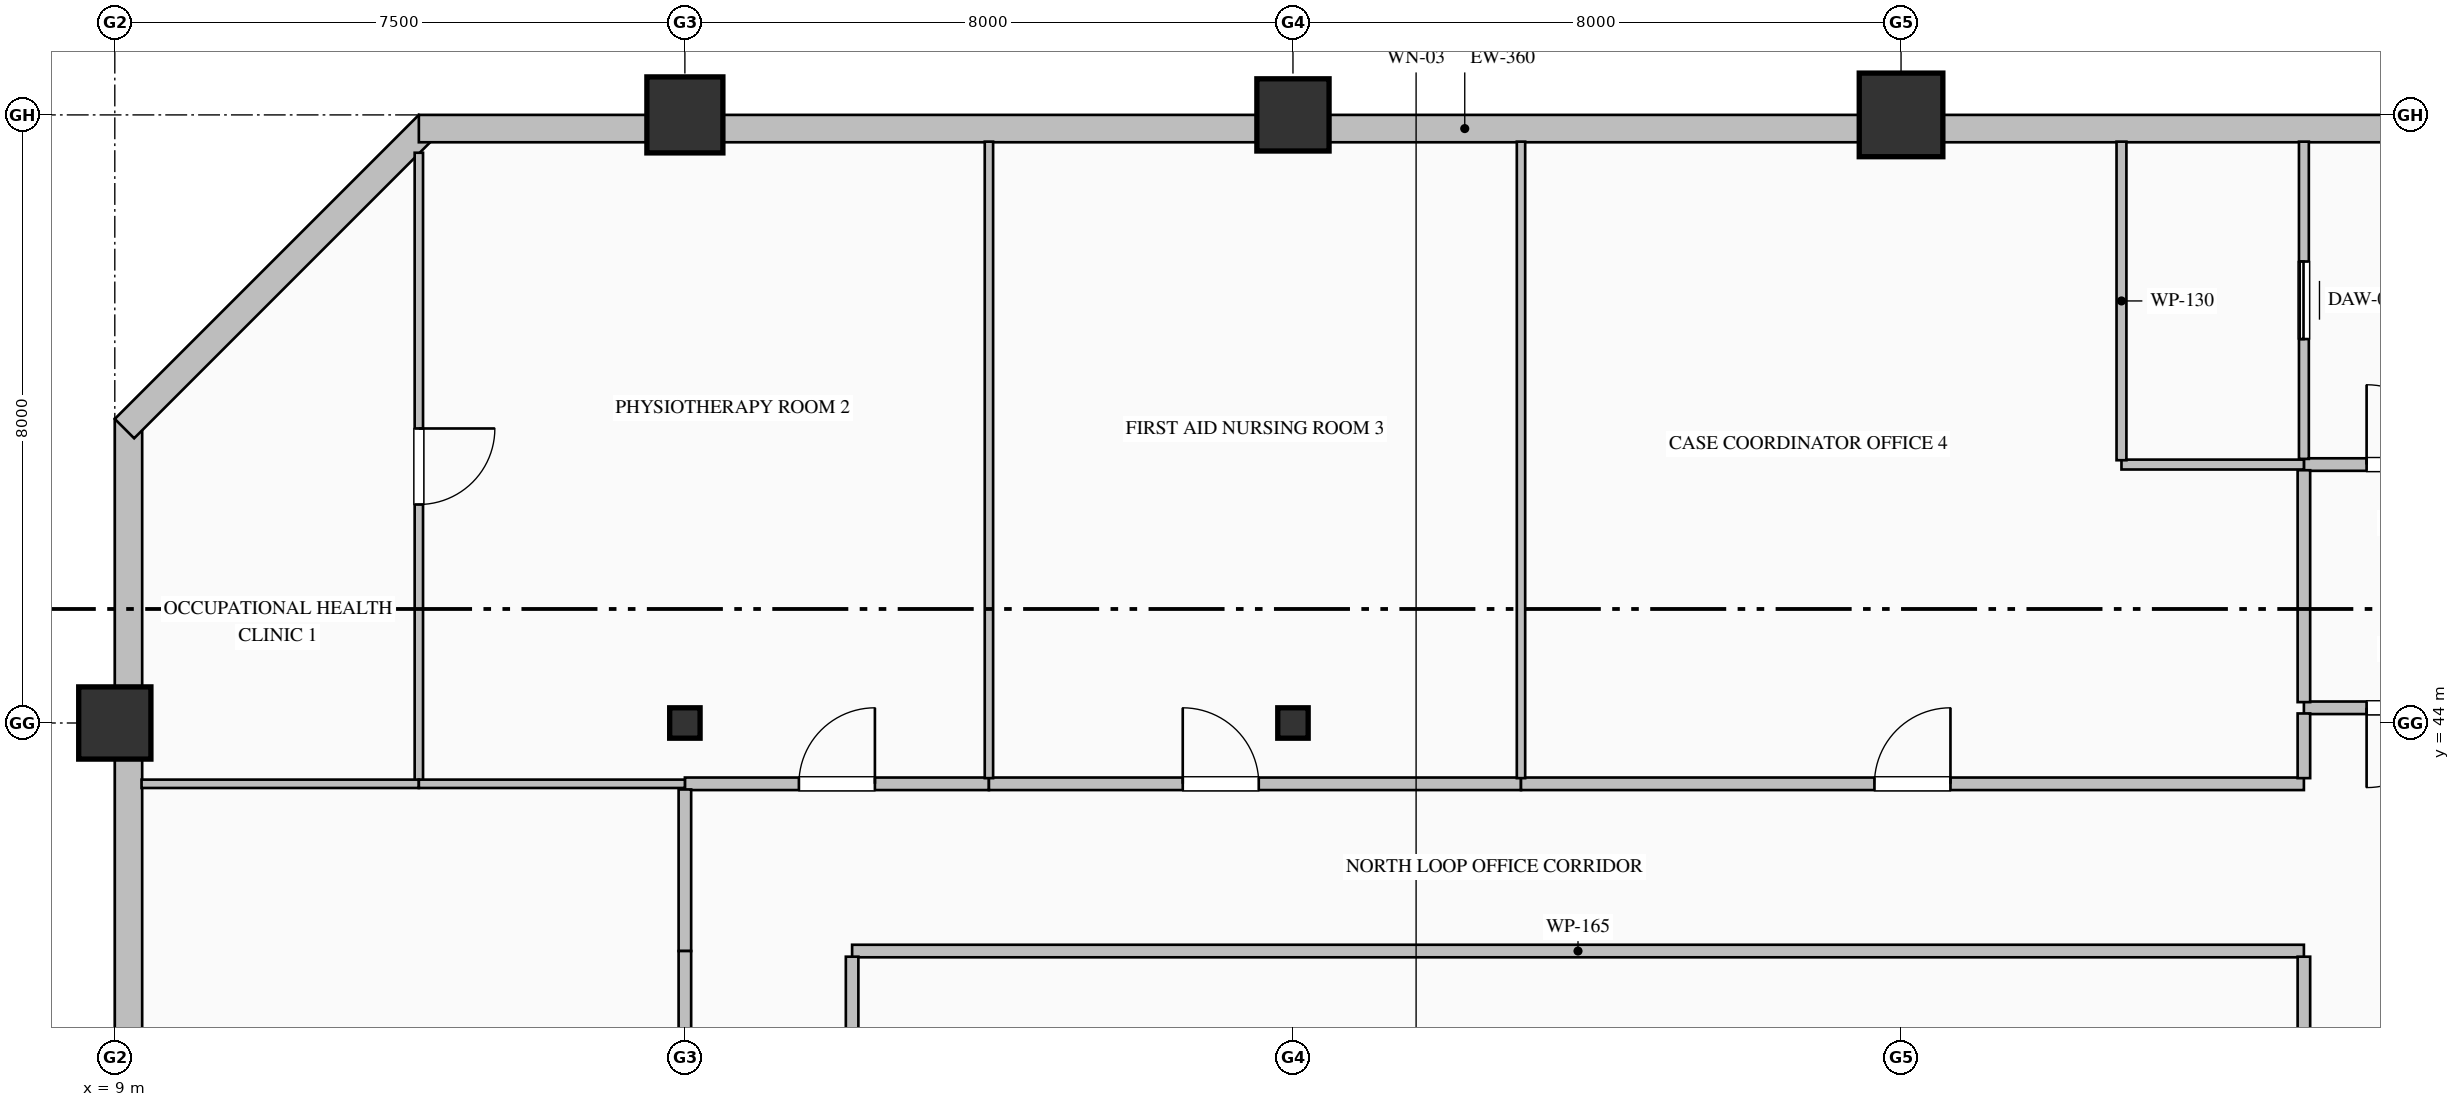
"""IFC4 building model, lengths in metres.
Left out: names, types, materials, properties, quantities, classifications, styles, units other than length and angle.
Written with IfcOpenShell. Run it as: python <this file> out.ifc"""

import sys

from ifc_helpers import new_model, si_unit, direction, frame, frame_2d, origin, origin_2d, place, context, subcontext, project, spatial, rectangle, hollow_rectangle, hollow_circle, i_section, extrude, element, fill, save


model = new_model("IFC4")
c1 = context("Model", 3, precision=1e-05, world=origin(), true_north=direction((0.0, 1.0)))
c2 = subcontext(c1, "Body", "Model", "MODEL_VIEW")
j1 = project(units=[si_unit("LENGTHUNIT", "METRE"), si_unit("PLANEANGLEUNIT", "RADIAN")], contexts=[c1])
p1 = place(None, origin())
s1 = spatial("IfcSite", under=j1, at=p1, CompositionType="ELEMENT")
p2 = place(p1, origin())
s2 = spatial("IfcBuilding", under=s1, at=p2, CompositionType="ELEMENT")
p3 = place(p2, frame((0.0, 0.0, 171.0)))
s3 = spatial("IfcBuildingStorey", under=s2, at=p3, CompositionType="ELEMENT", Elevation=171.0)
p4 = place(p3, frame((9.0, 44.0, 0.0), z_axis=(0.0, 0.0, 1.0), x_axis=(1.0, 0.0, 0.0)))
e1 = element("IfcColumn", 1, at=p4, inside=s3, PredefinedType="COLUMN", context=c2, shape_type="SweptSolid", body=[
    extrude(hollow_rectangle(XDim=0.95, YDim=0.95, WallThickness=0.036, at=origin_2d()), origin(), (0.0, 0.0, 1.0), 4.0),
])
p5 = place(p3, frame((16.5, 44.0, 0.0), z_axis=(0.0, 0.0, 1.0), x_axis=(1.0, 0.0, 0.0)))
e2 = element("IfcColumn", 2, at=p5, inside=s3, PredefinedType="COLUMN", context=c2, shape_type="SweptSolid", body=[
    extrude(i_section(OverallWidth=0.4, OverallDepth=0.4, WebThickness=0.013, FlangeThickness=0.021, FilletRadius=0.022, at=origin_2d()), origin(), (0.0, 0.0, 1.0), 4.0),
])
p6 = place(p3, frame((16.5, 52.0, 0.0), z_axis=(0.0, 0.0, 1.0), x_axis=(1.0, 0.0, 0.0)))
e3 = element("IfcColumn", 3, at=p6, inside=s3, PredefinedType="COLUMN", context=c2, shape_type="SweptSolid", body=[
    extrude(hollow_circle(Radius=0.5, WallThickness=0.036, at=origin_2d()), origin(), (0.0, 0.0, 1.0), 4.0),
])
p7 = place(p3, frame((24.5, 44.0, 0.0), z_axis=(0.0, 0.0, 1.0), x_axis=(1.0, 0.0, 0.0)))
e4 = element("IfcColumn", 4, at=p7, inside=s3, PredefinedType="COLUMN", context=c2, shape_type="SweptSolid", body=[
    extrude(i_section(OverallWidth=0.4, OverallDepth=0.4, WebThickness=0.013, FlangeThickness=0.021, FilletRadius=0.022, at=origin_2d()), origin(), (0.0, 0.0, 1.0), 4.0),
])
p8 = place(p3, frame((24.5, 52.0, 0.0), z_axis=(0.0, 0.0, 1.0), x_axis=(1.0, 0.0, 0.0)))
e5 = element("IfcColumn", 5, at=p8, inside=s3, PredefinedType="COLUMN", context=c2, shape_type="SweptSolid", body=[
    extrude(hollow_rectangle(XDim=0.95, YDim=0.95, WallThickness=0.036, at=origin_2d()), origin(), (0.0, 0.0, 1.0), 4.0),
])
p9 = place(p3, frame((32.5, 52.0, 0.0), z_axis=(0.0, 0.0, 1.0), x_axis=(1.0, 0.0, 0.0)))
e6 = element("IfcColumn", 6, at=p9, inside=s3, PredefinedType="COLUMN", context=c2, shape_type="SweptSolid", body=[
    extrude(hollow_rectangle(XDim=1.1, YDim=1.1, WallThickness=0.04, at=origin_2d()), origin(), (0.0, 0.0, 1.0), 4.0),
])
p10 = place(p3, frame((9.18, 32.0, 0.0), z_axis=(0.0, 0.0, 1.0), x_axis=(0.0, 1.0, 0.0)))
e7 = element("IfcWall", 7, at=p10, inside=s3, PredefinedType="SOLIDWALL", context=c2, shape_type="SweptSolid", body=[
    extrude(rectangle(XDim=16.0, YDim=0.36, at=frame_2d((8.0, 0.0))), origin(), (0.0, 0.0, 1.0), 3.265),
])
p11 = place(p10, frame((6.45, 0.0, 0.85)))
e8 = element("IfcOpeningElement", 8, at=p11, cuts=e7, PredefinedType="OPENING", context=c2, shape_type="SweptSolid", body=[
    extrude(rectangle(XDim=1.5, YDim=1.95, at=frame_2d((0.75, 0.975))), frame((0.0, 0.19, 0.0), z_axis=(0.0, -1.0, 0.0), x_axis=(1.0, 0.0, 0.0)), (0.0, 0.0, 1.0), 0.38),
])
p12 = place(p3, frame((9.127, 47.873, 0.0), z_axis=(0.0, 0.0, 1.0), x_axis=(0.707106781187, 0.707106781187, 0.0)))
e9 = element("IfcWall", 9, at=p12, inside=s3, PredefinedType="SOLIDWALL", context=c2, shape_type="SweptSolid", body=[
    extrude(rectangle(XDim=5.657, YDim=0.36, at=frame_2d((2.828, 0.0))), origin(), (0.0, 0.0, 1.0), 3.765),
])
p13 = place(p3, frame((13.0, 51.82, 0.0), z_axis=(0.0, 0.0, 1.0), x_axis=(1.0, 0.0, 0.0)))
e10 = element("IfcWall", 10, at=p13, inside=s3, PredefinedType="SOLIDWALL", context=c2, shape_type="SweptSolid", body=[
    extrude(rectangle(XDim=27.52, YDim=0.36, at=frame_2d((13.76, 0.0))), origin(), (0.0, 0.0, 1.0), 3.265),
])
p14 = place(p3, frame((37.8, 47.4, 0.0), z_axis=(0.0, 0.0, 1.0), x_axis=(1.0, 0.0, 0.0)))
e11 = element("IfcWall", 11, at=p14, inside=s3, PredefinedType="PARTITIONING", context=c2, shape_type="SweptSolid", body=[
    extrude(rectangle(XDim=2.7, YDim=0.165, at=frame_2d((1.35, 0.0))), origin(), (0.0, 0.0, 1.0), 3.765),
])
p15 = place(p14, frame((0.825, 0.0, 0.0)))
e12 = element("IfcOpeningElement", 12, at=p15, cuts=e11, PredefinedType="OPENING", context=c2, shape_type="SweptSolid", body=[
    extrude(rectangle(XDim=1.05, YDim=2.15, at=frame_2d((0.525, 1.075))), frame((0.0, 0.093, 0.0), z_axis=(0.0, -1.0, 0.0), x_axis=(1.0, 0.0, 0.0)), (0.0, 0.0, 1.0), 0.185),
])
p16 = place(p3, frame((40.5, 44.2, 0.0), z_axis=(0.0, 0.0, 1.0), x_axis=(-1.0, 0.0, 0.0)))
e13 = element("IfcWall", 13, at=p16, inside=s3, PredefinedType="PARTITIONING", context=c2, shape_type="SweptSolid", body=[
    extrude(rectangle(XDim=2.7, YDim=0.165, at=frame_2d((1.35, 0.0))), origin(), (0.0, 0.0, 1.0), 3.765),
])
p17 = place(p16, frame((0.825, 0.0, 0.0)))
e14 = element("IfcOpeningElement", 14, at=p17, cuts=e13, PredefinedType="OPENING", context=c2, shape_type="SweptSolid", body=[
    extrude(rectangle(XDim=1.05, YDim=2.15, at=frame_2d((0.525, 1.075))), frame((0.0, 0.093, 0.0), z_axis=(0.0, -1.0, 0.0), x_axis=(1.0, 0.0, 0.0)), (0.0, 0.0, 1.0), 0.185),
])
p18 = place(p3, frame((37.8, 44.274, 0.0), z_axis=(0.0, 0.0, 1.0), x_axis=(0.0, 1.0, 0.0)))
e15 = element("IfcWall", 15, at=p18, inside=s3, PredefinedType="PARTITIONING", context=c2, shape_type="SweptSolid", body=[
    extrude(rectangle(XDim=3.051, YDim=0.165, at=frame_2d((1.525, 0.0))), origin(), (0.0, 0.0, 1.0), 3.765),
])
p19 = place(p3, frame((37.8, 47.475, 0.0), z_axis=(0.0, 0.0, 1.0), x_axis=(0.0, 1.0, 0.0)))
e16 = element("IfcWall", 16, at=p19, inside=s3, PredefinedType="PARTITIONING", context=c2, shape_type="SweptSolid", body=[
    extrude(rectangle(XDim=4.173, YDim=0.13, at=frame_2d((2.087, 0.0))), origin(), (0.0, 0.0, 1.0), 3.765),
])
p20 = place(p19, frame((1.577, 0.0, 0.0)))
e17 = element("IfcOpeningElement", 17, at=p20, cuts=e16, PredefinedType="OPENING", context=c2, shape_type="SweptSolid", body=[
    extrude(rectangle(XDim=1.02, YDim=2.15, at=frame_2d((0.51, 1.075))), frame((0.0, 0.075, 0.0), z_axis=(0.0, -1.0, 0.0), x_axis=(1.0, 0.0, 0.0)), (0.0, 0.0, 1.0), 0.15),
])
p21 = place(p3, frame((37.8, 47.4, 0.0), z_axis=(0.0, 0.0, 1.0), x_axis=(-1.0, 0.0, 0.0)))
e18 = element("IfcWall", 18, at=p21, inside=s3, PredefinedType="PARTITIONING", context=c2, shape_type="SweptSolid", body=[
    extrude(rectangle(XDim=2.4, YDim=0.13, at=frame_2d((1.2, 0.0))), origin(), (0.0, 0.0, 1.0), 3.765),
])
p22 = place(p3, frame((35.4, 47.457, 0.0), z_axis=(0.0, 0.0, 1.0), x_axis=(0.0, 1.0, 0.0)))
e19 = element("IfcWall", 19, at=p22, inside=s3, PredefinedType="PARTITIONING", context=c2, shape_type="SweptSolid", body=[
    extrude(rectangle(XDim=4.191, YDim=0.13, at=frame_2d((2.095, 0.0))), origin(), (0.0, 0.0, 1.0), 3.765),
])
p23 = place(p3, frame((16.5, 43.2, 0.0), z_axis=(0.0, 0.0, 1.0), x_axis=(1.0, 0.0, 0.0)))
e20 = element("IfcWall", 20, at=p23, inside=s3, PredefinedType="PARTITIONING", context=c2, shape_type="SweptSolid", body=[
    extrude(rectangle(XDim=4.0, YDim=0.165, at=frame_2d((2.0, 0.0))), origin(), (0.0, 0.0, 1.0), 3.765),
])
p24 = place(p23, frame((1.5, 0.0, 0.0)))
e21 = element("IfcOpeningElement", 21, at=p24, cuts=e20, PredefinedType="OPENING", context=c2, shape_type="SweptSolid", body=[
    extrude(rectangle(XDim=1.0, YDim=2.15, at=frame_2d((0.5, 1.075))), frame((0.0, 0.093, 0.0), z_axis=(0.0, -1.0, 0.0), x_axis=(1.0, 0.0, 0.0)), (0.0, 0.0, 1.0), 0.185),
])
p25 = place(p3, frame((20.5, 43.2, 0.0), z_axis=(0.0, 0.0, 1.0), x_axis=(1.0, 0.0, 0.0)))
e22 = element("IfcWall", 22, at=p25, inside=s3, PredefinedType="PARTITIONING", context=c2, shape_type="SweptSolid", body=[
    extrude(rectangle(XDim=7.0, YDim=0.165, at=frame_2d((3.5, 0.0))), origin(), (0.0, 0.0, 1.0), 3.765),
])
p26 = place(p25, frame((2.55, 0.0, 0.0)))
e23 = element("IfcOpeningElement", 23, at=p26, cuts=e22, PredefinedType="OPENING", context=c2, shape_type="SweptSolid", body=[
    extrude(rectangle(XDim=1.0, YDim=2.15, at=frame_2d((0.5, 1.075))), frame((0.0, 0.093, 0.0), z_axis=(0.0, -1.0, 0.0), x_axis=(1.0, 0.0, 0.0)), (0.0, 0.0, 1.0), 0.185),
])
p27 = place(p3, frame((27.5, 43.2, 0.0), z_axis=(0.0, 0.0, 1.0), x_axis=(1.0, 0.0, 0.0)))
e24 = element("IfcWall", 24, at=p27, inside=s3, PredefinedType="PARTITIONING", context=c2, shape_type="SweptSolid", body=[
    extrude(rectangle(XDim=10.3, YDim=0.165, at=frame_2d((5.15, 0.0))), origin(), (0.0, 0.0, 1.0), 3.765),
])
p28 = place(p27, frame((4.65, 0.0, 0.0)))
e25 = element("IfcOpeningElement", 25, at=p28, cuts=e24, PredefinedType="OPENING", context=c2, shape_type="SweptSolid", body=[
    extrude(rectangle(XDim=1.0, YDim=2.15, at=frame_2d((0.5, 1.075))), frame((0.0, 0.093, 0.0), z_axis=(0.0, -1.0, 0.0), x_axis=(1.0, 0.0, 0.0)), (0.0, 0.0, 1.0), 0.185),
])
p29 = place(p3, frame((37.8, 41.0, 0.0), z_axis=(0.0, 0.0, 1.0), x_axis=(-1.0, 0.0, 0.0)))
e26 = element("IfcWall", 26, at=p29, inside=s3, PredefinedType="PARTITIONING", context=c2, shape_type="SweptSolid", body=[
    extrude(rectangle(XDim=19.1, YDim=0.165, at=frame_2d((9.55, 0.0))), origin(), (0.0, 0.0, 1.0), 3.765),
])
p30 = place(p3, frame((16.5, 41.0, 0.0), z_axis=(0.0, 0.0, 1.0), x_axis=(0.0, 1.0, 0.0)))
e27 = element("IfcWall", 27, at=p30, inside=s3, PredefinedType="PARTITIONING", context=c2, shape_type="SweptSolid", body=[
    extrude(rectangle(XDim=2.125, YDim=0.165, at=frame_2d((1.063, 0.0))), origin(), (0.0, 0.0, 1.0), 3.157),
])
p31 = place(p3, frame((18.7, 40.926, 0.0), z_axis=(0.0, 0.0, 1.0), x_axis=(0.0, -1.0, 0.0)))
e28 = element("IfcWall", 28, at=p31, inside=s3, PredefinedType="PARTITIONING", context=c2, shape_type="SweptSolid", body=[
    extrude(rectangle(XDim=7.451, YDim=0.165, at=frame_2d((3.726, 0.0))), origin(), (0.0, 0.0, 1.0), 3.765),
])
p32 = place(p3, frame((16.5, 33.4, 0.0), z_axis=(0.0, 0.0, 1.0), x_axis=(0.0, 1.0, 0.0)))
e29 = element("IfcWall", 29, at=p32, inside=s3, PredefinedType="PARTITIONING", context=c2, shape_type="SweptSolid", body=[
    extrude(rectangle(XDim=7.6, YDim=0.165, at=frame_2d((3.8, 0.0))), origin(), (0.0, 0.0, 1.0), 3.157),
])
p33 = place(p32, frame((3.3, 0.0, 0.0)))
e30 = element("IfcOpeningElement", 30, at=p33, cuts=e29, PredefinedType="OPENING", context=c2, shape_type="SweptSolid", body=[
    extrude(rectangle(XDim=1.0, YDim=2.15, at=frame_2d((0.5, 1.075))), frame((0.0, 0.093, 0.0), z_axis=(0.0, -1.0, 0.0), x_axis=(1.0, 0.0, 0.0)), (0.0, 0.0, 1.0), 0.185),
])
p34 = place(p3, frame((37.8, 43.274, 0.0), z_axis=(0.0, 0.0, 1.0), x_axis=(0.0, 1.0, 0.0)))
e31 = element("IfcWall", 31, at=p34, inside=s3, PredefinedType="PARTITIONING", context=c2, shape_type="SweptSolid", body=[
    extrude(rectangle(XDim=0.851, YDim=0.165, at=frame_2d((0.426, 0.0))), origin(), (0.0, 0.0, 1.0), 3.765),
])
p35 = place(p3, frame((37.8, 33.475, 0.0), z_axis=(0.0, 0.0, 1.0), x_axis=(0.0, 1.0, 0.0)))
e32 = element("IfcWall", 32, at=p35, inside=s3, PredefinedType="PARTITIONING", context=c2, shape_type="SweptSolid", body=[
    extrude(rectangle(XDim=7.451, YDim=0.165, at=frame_2d((3.726, 0.0))), origin(), (0.0, 0.0, 1.0), 3.765),
])
p36 = place(p3, frame((13.0, 51.502, 0.0), z_axis=(0.0, 0.0, 1.0), x_axis=(0.0, -1.0, 0.0)))
e33 = element("IfcWall", 33, at=p36, inside=s3, PredefinedType="MOVABLE", context=c2, shape_type="SweptSolid", body=[
    extrude(rectangle(XDim=8.255, YDim=0.11, at=frame_2d((4.127, 0.0))), origin(), (0.0, 0.0, 1.0), 3.765),
])
p37 = place(p36, frame((3.628, 0.0, 0.0)))
e34 = element("IfcOpeningElement", 34, at=p37, cuts=e33, PredefinedType="OPENING", context=c2, shape_type="SweptSolid", body=[
    extrude(rectangle(XDim=1.0, YDim=2.15, at=frame_2d((0.5, 1.075))), frame((0.0, 0.065, 0.0), z_axis=(0.0, -1.0, 0.0), x_axis=(1.0, 0.0, 0.0)), (0.0, 0.0, 1.0), 0.13),
])
p38 = place(p3, frame((13.0, 43.2, 0.0), z_axis=(0.0, 0.0, 1.0), x_axis=(-1.0, 0.0, 0.0)))
e35 = element("IfcWall", 35, at=p38, inside=s3, PredefinedType="MOVABLE", context=c2, shape_type="SweptSolid", body=[
    extrude(rectangle(XDim=3.648, YDim=0.11, at=frame_2d((1.824, 0.0))), origin(), (0.0, 0.0, 1.0), 3.765),
])
p39 = place(p3, frame((20.5, 51.648, 0.0), z_axis=(0.0, 0.0, 1.0), x_axis=(0.0, -1.0, 0.0)))
e36 = element("IfcWall", 36, at=p39, inside=s3, PredefinedType="MOVABLE", context=c2, shape_type="SweptSolid", body=[
    extrude(rectangle(XDim=8.374, YDim=0.11, at=frame_2d((4.187, 0.0))), origin(), (0.0, 0.0, 1.0), 3.765),
])
p40 = place(p3, frame((16.5, 43.2, 0.0), z_axis=(0.0, 0.0, 1.0), x_axis=(-1.0, 0.0, 0.0)))
e37 = element("IfcWall", 37, at=p40, inside=s3, PredefinedType="MOVABLE", context=c2, shape_type="SweptSolid", body=[
    extrude(rectangle(XDim=3.5, YDim=0.11, at=frame_2d((1.75, 0.0))), origin(), (0.0, 0.0, 1.0), 3.765),
])
p41 = place(p3, frame((27.5, 51.648, 0.0), z_axis=(0.0, 0.0, 1.0), x_axis=(0.0, -1.0, 0.0)))
e38 = element("IfcWall", 38, at=p41, inside=s3, PredefinedType="MOVABLE", context=c2, shape_type="SweptSolid", body=[
    extrude(rectangle(XDim=8.374, YDim=0.11, at=frame_2d((4.187, 0.0))), origin(), (0.0, 0.0, 1.0), 3.765),
])
p42 = place(p15, origin())
e39 = element("IfcDoor", 39, at=p42, inside=s3, OperationType="SINGLE_SWING_LEFT", PredefinedType="DOOR", context=c2, shape_type="SweptSolid", body=[
    extrude(rectangle(XDim=1.05, YDim=2.15, at=frame_2d((0.525, 1.075))), frame((0.0, 0.025, 0.0), z_axis=(0.0, -1.0, 0.0), x_axis=(1.0, 0.0, 0.0)), (0.0, 0.0, 1.0), 0.05),
])
fill(e12, e39)
p43 = place(p17, origin())
e40 = element("IfcDoor", 40, at=p43, inside=s3, OperationType="SINGLE_SWING_RIGHT", PredefinedType="DOOR", context=c2, shape_type="SweptSolid", body=[
    extrude(rectangle(XDim=1.05, YDim=2.15, at=frame_2d((0.525, 1.075))), frame((0.0, 0.025, 0.0), z_axis=(0.0, -1.0, 0.0), x_axis=(1.0, 0.0, 0.0)), (0.0, 0.0, 1.0), 0.05),
])
fill(e14, e40)
p44 = place(p20, origin())
e41 = element("IfcDoor", 41, at=p44, inside=s3, OperationType="SLIDING_TO_LEFT", PredefinedType="DOOR", context=c2, shape_type="SweptSolid", body=[
    extrude(rectangle(XDim=1.02, YDim=2.15, at=frame_2d((0.51, 1.075))), frame((0.0, 0.025, 0.0), z_axis=(0.0, -1.0, 0.0), x_axis=(1.0, 0.0, 0.0)), (0.0, 0.0, 1.0), 0.05),
])
fill(e17, e41)
p45 = place(p37, origin())
e42 = element("IfcDoor", 42, at=p45, inside=s3, OperationType="SINGLE_SWING_LEFT", PredefinedType="DOOR", context=c2, shape_type="SweptSolid", body=[
    extrude(rectangle(XDim=1.0, YDim=2.15, at=frame_2d((0.5, 1.075))), frame((0.0, 0.025, 0.0), z_axis=(0.0, -1.0, 0.0), x_axis=(1.0, 0.0, 0.0)), (0.0, 0.0, 1.0), 0.05),
])
fill(e34, e42)
p46 = place(p24, origin())
e43 = element("IfcDoor", 43, at=p46, inside=s3, OperationType="SINGLE_SWING_RIGHT", PredefinedType="DOOR", context=c2, shape_type="SweptSolid", body=[
    extrude(rectangle(XDim=1.0, YDim=2.15, at=frame_2d((0.5, 1.075))), frame((0.0, 0.025, 0.0), z_axis=(0.0, -1.0, 0.0), x_axis=(1.0, 0.0, 0.0)), (0.0, 0.0, 1.0), 0.05),
])
fill(e21, e43)
p47 = place(p26, origin())
e44 = element("IfcDoor", 44, at=p47, inside=s3, OperationType="SINGLE_SWING_LEFT", PredefinedType="DOOR", context=c2, shape_type="SweptSolid", body=[
    extrude(rectangle(XDim=1.0, YDim=2.15, at=frame_2d((0.5, 1.075))), frame((0.0, 0.025, 0.0), z_axis=(0.0, -1.0, 0.0), x_axis=(1.0, 0.0, 0.0)), (0.0, 0.0, 1.0), 0.05),
])
fill(e23, e44)
p48 = place(p28, origin())
e45 = element("IfcDoor", 45, at=p48, inside=s3, OperationType="SINGLE_SWING_RIGHT", PredefinedType="DOOR", context=c2, shape_type="SweptSolid", body=[
    extrude(rectangle(XDim=1.0, YDim=2.15, at=frame_2d((0.5, 1.075))), frame((0.0, 0.025, 0.0), z_axis=(0.0, -1.0, 0.0), x_axis=(1.0, 0.0, 0.0)), (0.0, 0.0, 1.0), 0.05),
])
fill(e25, e45)
save(model, sys.argv[1])
